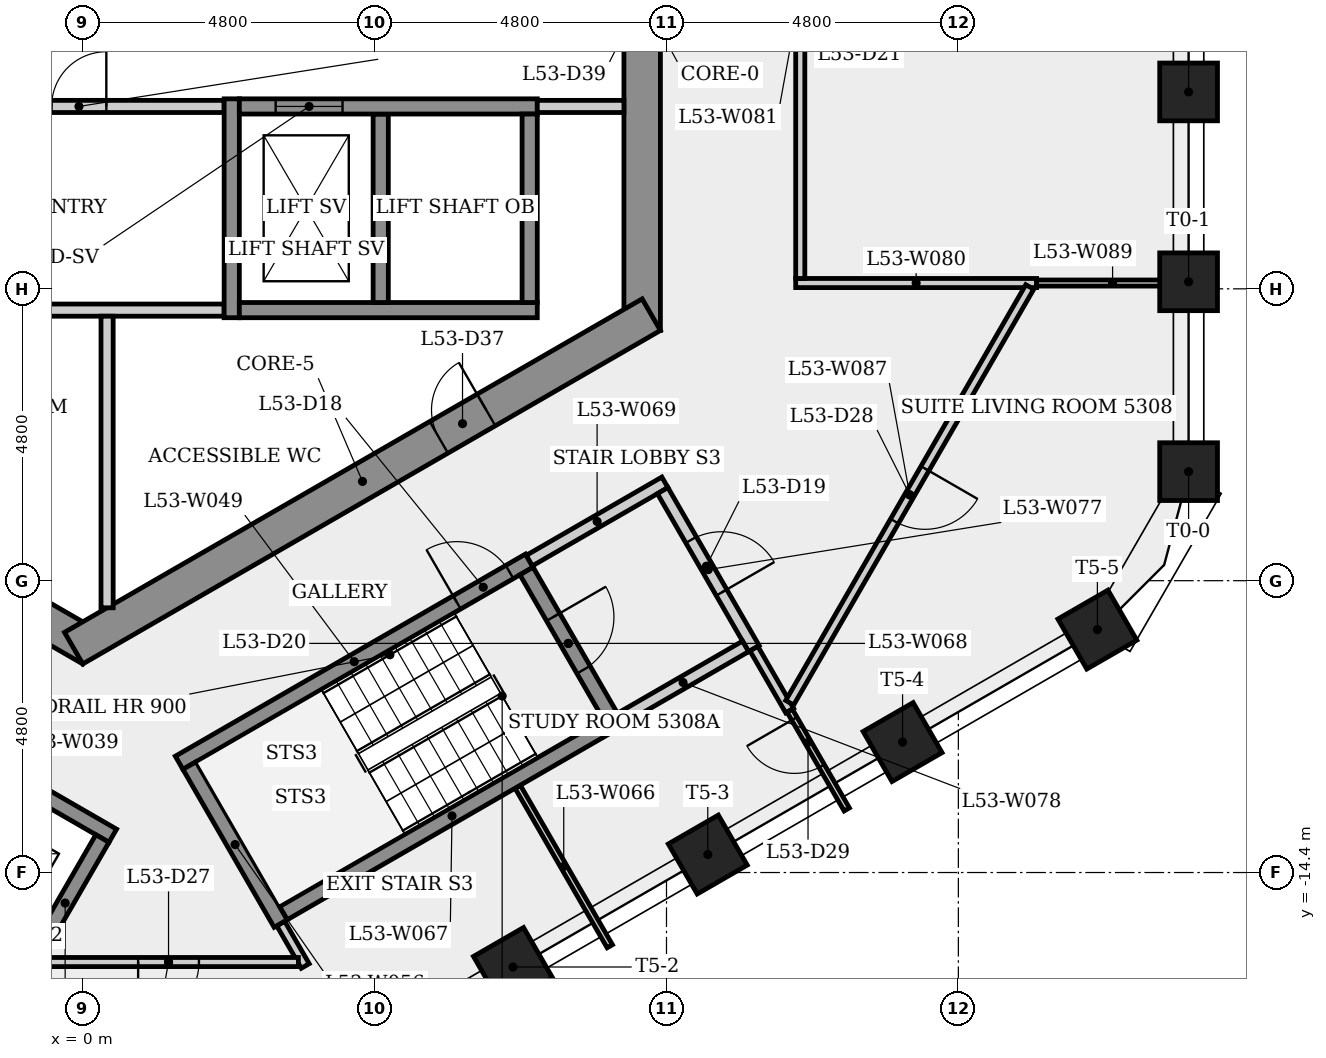
"""IFC4 building model, lengths in metres.
Left out: names, types, materials, properties, quantities, classifications, styles, units other than length and angle.
Written with IfcOpenShell. Run it as: python <this file> out.ifc"""

import sys

from ifc_helpers import new_model, si_unit, direction, frame, frame_2d, origin, origin_2d, place, context, subcontext, project, spatial, rectangle, extrude, element, fill, save


model = new_model("IFC4")
c1 = context("Model", 3, precision=1e-05, world=origin(), true_north=direction((0.0, 1.0)))
c2 = subcontext(c1, "Body", "Model", "MODEL_VIEW")
j1 = project(units=[si_unit("LENGTHUNIT", "METRE"), si_unit("PLANEANGLEUNIT", "RADIAN")], contexts=[c1])
p1 = place(None, origin())
s1 = spatial("IfcSite", under=j1, at=p1, CompositionType="ELEMENT")
p2 = place(p1, origin())
s2 = spatial("IfcBuilding", under=s1, at=p2, CompositionType="ELEMENT")
p3 = place(p2, frame((0.0, 0.0, 198.7)))
s3 = spatial("IfcBuildingStorey", under=s2, at=p3, CompositionType="ELEMENT", Elevation=198.7)
p4 = place(p3, frame((9.2, -5.485, 0.0), z_axis=(0.0, 0.0, 1.0), x_axis=(0.0, 1.0, 0.0)))
e1 = element("IfcWall", 1, at=p4, inside=s3, PredefinedType="SHEAR", context=c2, shape_type="SweptSolid", body=[
    extrude(rectangle(XDim=10.97, YDim=0.6, at=frame_2d((5.485, 0.0))), origin(), (0.0, 0.0, 1.0), 3.4),
])
p5 = place(p4, frame((4.685, 0.0, 0.0)))
e2 = element("IfcOpeningElement", 2, at=p5, cuts=e1, PredefinedType="OPENING", context=c2, shape_type="SweptSolid", body=[
    extrude(rectangle(XDim=1.6, YDim=2.1, at=frame_2d((0.8, 1.05))), frame((0.0, 0.31, 0.0), z_axis=(0.0, -1.0, 0.0), x_axis=(1.0, 0.0, 0.0)), (0.0, 0.0, 1.0), 0.62),
])
p6 = place(p3, frame((-9.35, -5.225, 0.0), z_axis=(0.0, 0.0, 1.0), x_axis=(0.866023993627, -0.500002442456, 0.0)))
e3 = element("IfcWall", 3, at=p6, inside=s3, PredefinedType="SHEAR", context=c2, shape_type="SweptSolid", body=[
    extrude(rectangle(XDim=10.97, YDim=0.6, at=frame_2d((5.485, 0.0))), origin(), (0.0, 0.0, 1.0), 3.4),
])
p7 = place(p6, frame((3.084, 0.0, 0.0)))
e4 = element("IfcOpeningElement", 4, at=p7, cuts=e3, PredefinedType="OPENING", context=c2, shape_type="SweptSolid", body=[
    extrude(rectangle(XDim=0.9, YDim=2.1, at=frame_2d((0.45, 1.05))), frame((0.0, 0.31, 0.0), z_axis=(0.0, -1.0, 0.0), x_axis=(1.0, 0.0, 0.0)), (0.0, 0.0, 1.0), 0.62),
])
p8 = place(p6, frame((8.21, 0.0, 0.0)))
e5 = element("IfcOpeningElement", 5, at=p8, cuts=e3, PredefinedType="OPENING", context=c2, shape_type="SweptSolid", body=[
    extrude(rectangle(XDim=0.9, YDim=2.1, at=frame_2d((0.45, 1.05))), frame((0.0, 0.31, 0.0), z_axis=(0.0, -1.0, 0.0), x_axis=(1.0, 0.0, 0.0)), (0.0, 0.0, 1.0), 0.62),
])
p9 = place(p3, frame((-0.15, -10.71, 0.0), z_axis=(0.0, 0.0, 1.0), x_axis=(0.866023993627, 0.500002442456, 0.0)))
e6 = element("IfcWall", 6, at=p9, inside=s3, PredefinedType="SHEAR", context=c2, shape_type="SweptSolid", body=[
    extrude(rectangle(XDim=10.97, YDim=0.6, at=frame_2d((5.485, 0.0))), origin(), (0.0, 0.0, 1.0), 3.4),
])
p10 = place(p9, frame((6.935, 0.0, 0.0)))
e7 = element("IfcOpeningElement", 7, at=p10, cuts=e6, PredefinedType="OPENING", context=c2, shape_type="SweptSolid", body=[
    extrude(rectangle(XDim=0.9, YDim=2.1, at=frame_2d((0.45, 1.05))), frame((0.0, 0.31, 0.0), z_axis=(0.0, -1.0, 0.0), x_axis=(1.0, 0.0, 0.0)), (0.0, 0.0, 1.0), 0.62),
])
for number, where, z_axis, x_axis in (
    (8, (18.187, -7.807, 0.0), (0.0, 0.0, 1.0), (1.0, 0.0, 0.0)),
    (9, (18.187, -4.684, 0.0), (0.0, 0.0, 1.0), (1.0, 0.0, 0.0)),
    (10, (18.187, -1.561, 0.0), (0.0, 0.0, 1.0), (1.0, 0.0, 0.0)),
    (11, (7.075, -15.954, 0.0), (0.0, 0.0, 1.0), (0.5, -0.866, 0.0)),
    (12, (10.279, -14.104, 0.0), (0.0, 0.0, 1.0), (0.5, -0.866, 0.0)),
    (13, (13.483, -12.254, 0.0), (0.0, 0.0, 1.0), (0.5, -0.866, 0.0)),
    (14, (16.687, -10.405, 0.0), (0.0, 0.0, 1.0), (0.5, -0.866, 0.0)),
):
    element("IfcColumn", number, at=place(p3, frame(where, z_axis=z_axis, x_axis=x_axis)), inside=s3, PredefinedType="COLUMN", context=c2, shape_type="SweptSolid", body=[
        extrude(rectangle(XDim=0.95, YDim=0.95, at=origin_2d()), origin(), (0.0, 0.0, 1.0), 3.4),
    ])
p11 = place(p3, frame((-8.88, -5.15, 0.0), z_axis=(0.0, 0.0, 1.0), x_axis=(1.0, 0.0, 0.0)))
e15 = element("IfcWall", 15, at=p11, inside=s3, PredefinedType="PARTITIONING", context=c2, shape_type="SweptSolid", body=[
    extrude(rectangle(XDim=11.205, YDim=0.2, at=frame_2d((5.603, 0.0))), origin(), (0.0, 0.0, 1.0), 3.0),
])
p12 = place(p3, frame((-8.9, -1.8, 0.0), z_axis=(0.0, 0.0, 1.0), x_axis=(1.0, 0.0, 0.0)))
e16 = element("IfcWall", 16, at=p12, inside=s3, PredefinedType="PARTITIONING", context=c2, shape_type="SweptSolid", body=[
    extrude(rectangle(XDim=11.225, YDim=0.2, at=frame_2d((5.613, 0.0))), origin(), (0.0, 0.0, 1.0), 3.0),
])
p13 = place(p12, frame((2.485, 0.0, 0.0)))
e17 = element("IfcOpeningElement", 17, at=p13, cuts=e16, PredefinedType="OPENING", context=c2, shape_type="SweptSolid", body=[
    extrude(rectangle(XDim=0.9, YDim=2.1, at=frame_2d((0.45, 1.05))), frame((0.0, 0.11, 0.0), z_axis=(0.0, -1.0, 0.0), x_axis=(1.0, 0.0, 0.0)), (0.0, 0.0, 1.0), 0.22),
])
p14 = place(p12, frame((8.387, 0.0, 0.0)))
e18 = element("IfcOpeningElement", 18, at=p14, cuts=e16, PredefinedType="OPENING", context=c2, shape_type="SweptSolid", body=[
    extrude(rectangle(XDim=0.9, YDim=2.1, at=frame_2d((0.45, 1.05))), frame((0.0, 0.11, 0.0), z_axis=(0.0, -1.0, 0.0), x_axis=(1.0, 0.0, 0.0)), (0.0, 0.0, 1.0), 0.22),
])
p15 = place(p3, frame((-2.364, -12.145, 0.0), z_axis=(0.0, 0.0, 1.0), x_axis=(0.866040211805, -0.499974350878, 0.0)))
e19 = element("IfcWall", 19, at=p15, inside=s3, PredefinedType="SHEAR", context=c2, shape_type="SweptSolid", body=[
    extrude(rectangle(XDim=3.3, YDim=0.25, at=frame_2d((1.65, 0.0))), origin(), (0.0, 0.0, 1.0), 3.0),
])
p16 = place(p3, frame((-0.902, -15.962, 0.0), z_axis=(0.0, 0.0, 1.0), x_axis=(0.500061746146, 0.865989751695, 0.0)))
e20 = element("IfcWall", 20, at=p16, inside=s3, PredefinedType="SHEAR", context=c2, shape_type="SweptSolid", body=[
    extrude(rectangle(XDim=2.45, YDim=0.25, at=frame_2d((1.225, 0.0))), origin(), (0.0, 0.0, 1.0), 3.4),
])
p17 = place(p3, frame((0.4, -5.25, 0.0), z_axis=(0.0, 0.0, 1.0), x_axis=(0.0, -1.0, 0.0)))
e21 = element("IfcWall", 21, at=p17, inside=s3, PredefinedType="PARTITIONING", context=c2, shape_type="SweptSolid", body=[
    extrude(rectangle(XDim=4.796, YDim=0.2, at=frame_2d((2.398, 0.0))), origin(), (0.0, 0.0, 1.0), 3.0),
])
p18 = place(p3, frame((1.585, -12.595, 0.0), z_axis=(0.0, 0.0, 1.0), x_axis=(0.866036417653, 0.499980922934, 0.0)))
e22 = element("IfcWall", 22, at=p18, inside=s3, PredefinedType="SHEAR", context=c2, shape_type="SweptSolid", body=[
    extrude(rectangle(XDim=6.65, YDim=0.25, at=frame_2d((3.325, 0.0))), origin(), (0.0, 0.0, 1.0), 3.0),
])
p19 = place(p18, frame((5.275, 0.0, 0.0)))
e23 = element("IfcOpeningElement", 23, at=p19, cuts=e22, PredefinedType="OPENING", context=c2, shape_type="SweptSolid", body=[
    extrude(rectangle(XDim=1.0, YDim=2.1, at=frame_2d((0.5, 1.05))), frame((0.0, 0.135, 0.0), z_axis=(0.0, -1.0, 0.0), x_axis=(1.0, 0.0, 0.0)), (0.0, 0.0, 1.0), 0.27),
])
p20 = place(p3, frame((2.45, -5.275, 0.0), z_axis=(0.0, 0.0, 1.0), x_axis=(0.0, 1.0, 0.0)))
e24 = element("IfcWall", 24, at=p20, inside=s3, PredefinedType="SHEAR", context=c2, shape_type="SweptSolid", body=[
    extrude(rectangle(XDim=3.6, YDim=0.25, at=frame_2d((1.8, 0.0))), origin(), (0.0, 0.0, 1.0), 3.0),
])
p21 = place(p3, frame((3.256, -15.239, 0.0), z_axis=(0.0, 0.0, 1.0), x_axis=(0.499818546685, -0.866130140562, 0.0)))
e25 = element("IfcWall", 25, at=p21, inside=s3, PredefinedType="PARTITIONING", context=c2, shape_type="SweptSolid", body=[
    extrude(rectangle(XDim=0.806, YDim=0.15, at=frame_2d((0.403, 0.0))), origin(), (0.0, 0.0, 1.0), 3.0),
])
p22 = place(p3, frame((3.256, -15.239, 0.0), z_axis=(0.0, 0.0, 1.0), x_axis=(-0.50002537861, 0.866010750942, 0.0)))
e26 = element("IfcWall", 26, at=p22, inside=s3, PredefinedType="SHEAR", context=c2, shape_type="SweptSolid", body=[
    extrude(rectangle(XDim=3.0, YDim=0.25, at=frame_2d((1.5, 0.0))), origin(), (0.0, 0.0, 1.0), 3.0),
])
p23 = place(p3, frame((3.546, -15.872, 0.0), z_axis=(0.0, 0.0, 1.0), x_axis=(-1.0, 0.0, 0.0)))
e27 = element("IfcWall", 27, at=p23, inside=s3, PredefinedType="PARTITIONING", context=c2, shape_type="SweptSolid", body=[
    extrude(rectangle(XDim=4.271, YDim=0.15, at=frame_2d((2.136, 0.0))), origin(), (0.0, 0.0, 1.0), 3.0),
])
p24 = place(p23, frame((1.636, 0.0, 0.0)))
e28 = element("IfcOpeningElement", 28, at=p24, cuts=e27, PredefinedType="OPENING", context=c2, shape_type="SweptSolid", body=[
    extrude(rectangle(XDim=1.0, YDim=2.1, at=frame_2d((0.5, 1.05))), frame((0.0, 0.085, 0.0), z_axis=(0.0, -1.0, 0.0), x_axis=(1.0, 0.0, 0.0)), (0.0, 0.0, 1.0), 0.17),
])
p25 = place(p3, frame((2.575, -5.15, 0.0), z_axis=(0.0, 0.0, 1.0), x_axis=(1.0, 0.0, 0.0)))
e29 = element("IfcWall", 29, at=p25, inside=s3, PredefinedType="SHEAR", context=c2, shape_type="SweptSolid", body=[
    extrude(rectangle(XDim=4.9, YDim=0.25, at=frame_2d((2.45, 0.0))), origin(), (0.0, 0.0, 1.0), 3.0),
])
p26 = place(p3, frame((4.9, -1.925, 0.0), z_axis=(0.0, 0.0, 1.0), x_axis=(0.0, -1.0, 0.0)))
e30 = element("IfcWall", 30, at=p26, inside=s3, PredefinedType="SHEAR", context=c2, shape_type="SweptSolid", body=[
    extrude(rectangle(XDim=3.1, YDim=0.25, at=frame_2d((1.55, 0.0))), origin(), (0.0, 0.0, 1.0), 3.4),
])
p27 = place(p3, frame((2.575, -1.8, 0.0), z_axis=(0.0, 0.0, 1.0), x_axis=(1.0, 0.0, 0.0)))
e31 = element("IfcWall", 31, at=p27, inside=s3, PredefinedType="SHEAR", context=c2, shape_type="SweptSolid", body=[
    extrude(rectangle(XDim=4.9, YDim=0.25, at=frame_2d((2.45, 0.0))), origin(), (0.0, 0.0, 1.0), 3.0),
])
p28 = place(p27, frame((0.597, 0.0, 0.0)))
e32 = element("IfcOpeningElement", 32, at=p28, cuts=e31, PredefinedType="OPENING", context=c2, shape_type="SweptSolid", body=[
    extrude(rectangle(XDim=1.1, YDim=2.1, at=frame_2d((0.55, 1.05))), frame((0.0, 0.135, 0.0), z_axis=(0.0, -1.0, 0.0), x_axis=(1.0, 0.0, 0.0)), (0.0, 0.0, 1.0), 0.27),
])
p29 = place(p3, frame((7.153, -12.989, 0.0), z_axis=(0.0, 0.0, 1.0), x_axis=(0.500013093982, -0.866017843839, 0.0)))
e33 = element("IfcWall", 33, at=p29, inside=s3, PredefinedType="PARTITIONING", context=c2, shape_type="SweptSolid", body=[
    extrude(rectangle(XDim=3.03, YDim=0.1, at=frame_2d((1.515, 0.0))), origin(), (0.0, 0.0, 1.0), 3.0),
])
p30 = place(p3, frame((3.301, -15.068, 0.0), z_axis=(0.0, 0.0, 1.0), x_axis=(0.866035036182, 0.499983315828, 0.0)))
e34 = element("IfcWall", 34, at=p30, inside=s3, PredefinedType="SHEAR", context=c2, shape_type="SweptSolid", body=[
    extrude(rectangle(XDim=6.4, YDim=0.25, at=frame_2d((3.2, 0.0))), origin(), (0.0, 0.0, 1.0), 3.0),
])
p31 = place(p3, frame((7.298, -9.441, 0.0), z_axis=(0.0, 0.0, 1.0), x_axis=(0.500034990121, -0.866005201286, 0.0)))
e35 = element("IfcWall", 35, at=p31, inside=s3, PredefinedType="SHEAR", context=c2, shape_type="SweptSolid", body=[
    extrude(rectangle(XDim=2.75, YDim=0.25, at=frame_2d((1.375, 0.0))), origin(), (0.0, 0.0, 1.0), 3.0),
])
p32 = place(p31, frame((0.875, 0.0, 0.0)))
e36 = element("IfcOpeningElement", 36, at=p32, cuts=e35, PredefinedType="OPENING", context=c2, shape_type="SweptSolid", body=[
    extrude(rectangle(XDim=1.0, YDim=2.1, at=frame_2d((0.5, 1.05))), frame((0.0, 0.135, 0.0), z_axis=(0.0, -1.0, 0.0), x_axis=(1.0, 0.0, 0.0)), (0.0, 0.0, 1.0), 0.27),
])
p33 = place(p3, frame((7.344, -9.27, 0.0), z_axis=(0.0, 0.0, 1.0), x_axis=(0.866005588531, 0.500034319456, 0.0)))
e37 = element("IfcWall", 37, at=p33, inside=s3, PredefinedType="PARTITIONING", context=c2, shape_type="SweptSolid", body=[
    extrude(rectangle(XDim=2.575, YDim=0.2, at=frame_2d((1.288, 0.0))), origin(), (0.0, 0.0, 1.0), 3.0),
])
p34 = place(p3, frame((7.35, -1.925, 0.0), z_axis=(0.0, 0.0, 1.0), x_axis=(0.0, -1.0, 0.0)))
e38 = element("IfcWall", 38, at=p34, inside=s3, PredefinedType="SHEAR", context=c2, shape_type="SweptSolid", body=[
    extrude(rectangle(XDim=3.1, YDim=0.25, at=frame_2d((1.55, 0.0))), origin(), (0.0, 0.0, 1.0), 3.4),
])
p35 = place(p3, frame((8.9, -1.8, 0.0), z_axis=(0.0, 0.0, 1.0), x_axis=(-1.0, 0.0, 0.0)))
e39 = element("IfcWall", 39, at=p35, inside=s3, PredefinedType="PARTITIONING", context=c2, shape_type="SweptSolid", body=[
    extrude(rectangle(XDim=1.425, YDim=0.2, at=frame_2d((0.712, 0.0))), origin(), (0.0, 0.0, 1.0), 3.0),
])
p36 = place(p3, frame((9.537, -8.119, 0.0), z_axis=(0.0, 0.0, 1.0), x_axis=(0.499990139034, -0.866031096941, 0.0)))
e40 = element("IfcWall", 40, at=p36, inside=s3, PredefinedType="PARTITIONING", context=c2, shape_type="SweptSolid", body=[
    extrude(rectangle(XDim=3.0, YDim=0.2, at=frame_2d((1.5, 0.0))), origin(), (0.0, 0.0, 1.0), 3.0),
])
p37 = place(p36, frame((0.935, 0.0, 0.0)))
e41 = element("IfcOpeningElement", 41, at=p37, cuts=e40, PredefinedType="OPENING", context=c2, shape_type="SweptSolid", body=[
    extrude(rectangle(XDim=1.0, YDim=2.1, at=frame_2d((0.5, 1.05))), frame((0.0, 0.11, 0.0), z_axis=(0.0, -1.0, 0.0), x_axis=(1.0, 0.0, 0.0)), (0.0, 0.0, 1.0), 0.22),
])
p38 = place(p3, frame((10.901, -10.681, 0.0), z_axis=(0.0, 0.0, 1.0), x_axis=(-0.866007538022, -0.500030943131, 0.0)))
e42 = element("IfcWall", 42, at=p38, inside=s3, PredefinedType="PARTITIONING", context=c2, shape_type="SweptSolid", body=[
    extrude(rectangle(XDim=2.375, YDim=0.2, at=frame_2d((1.188, 0.0))), origin(), (0.0, 0.0, 1.0), 3.0),
])
p39 = place(p3, frame((11.626, -11.737, 0.0), z_axis=(0.0, 0.0, 1.0), x_axis=(-0.499883919394, 0.866092412582, 0.0)))
e43 = element("IfcWall", 43, at=p39, inside=s3, PredefinedType="PARTITIONING", context=c2, shape_type="SweptSolid", body=[
    extrude(rectangle(XDim=1.178, YDim=0.15, at=frame_2d((0.589, 0.0))), origin(), (0.0, 0.0, 1.0), 3.0),
])
p40 = place(p3, frame((11.725, -4.705, 0.0), z_axis=(0.0, 0.0, 1.0), x_axis=(1.0, 0.0, 0.0)))
e44 = element("IfcWall", 44, at=p40, inside=s3, PredefinedType="PARTITIONING", context=c2, shape_type="SweptSolid", body=[
    extrude(rectangle(XDim=3.962, YDim=0.15, at=frame_2d((1.981, 0.0))), origin(), (0.0, 0.0, 1.0), 3.0),
])
p41 = place(p3, frame((11.8, 4.78, 0.0), z_axis=(0.0, 0.0, 1.0), x_axis=(0.0, -1.0, 0.0)))
e45 = element("IfcWall", 45, at=p41, inside=s3, PredefinedType="PARTITIONING", context=c2, shape_type="SweptSolid", body=[
    extrude(rectangle(XDim=9.409, YDim=0.15, at=frame_2d((4.705, 0.0))), origin(), (0.0, 0.0, 1.0), 3.0),
])
p42 = place(p41, frame((4.257, 0.0, 0.0)))
e46 = element("IfcOpeningElement", 46, at=p42, cuts=e45, PredefinedType="OPENING", context=c2, shape_type="SweptSolid", body=[
    extrude(rectangle(XDim=1.0, YDim=2.1, at=frame_2d((0.5, 1.05))), frame((0.0, 0.085, 0.0), z_axis=(0.0, -1.0, 0.0), x_axis=(1.0, 0.0, 0.0)), (0.0, 0.0, 1.0), 0.17),
])
p43 = place(p3, frame((12.565, -13.363, 0.0), z_axis=(0.0, 0.0, 1.0), x_axis=(-0.500056514623, 0.865992772593, 0.0)))
e47 = element("IfcWall", 47, at=p43, inside=s3, PredefinedType="PARTITIONING", context=c2, shape_type="SweptSolid", body=[
    extrude(rectangle(XDim=1.877, YDim=0.1, at=frame_2d((0.938, 0.0))), origin(), (0.0, 0.0, 1.0), 3.0),
])
p44 = place(p43, frame((0.824, 0.0, 0.0)))
e48 = element("IfcOpeningElement", 48, at=p44, cuts=e47, PredefinedType="OPENING", context=c2, shape_type="SweptSolid", body=[
    extrude(rectangle(XDim=0.9, YDim=2.1, at=frame_2d((0.45, 1.05))), frame((0.0, 0.06, 0.0), z_axis=(0.0, -1.0, 0.0), x_axis=(1.0, 0.0, 0.0)), (0.0, 0.0, 1.0), 0.12),
])
p45 = place(p3, frame((15.574, -4.769, 0.0), z_axis=(0.0, 0.0, 1.0), x_axis=(-0.499999914436, -0.866025453185, 0.0)))
e49 = element("IfcWall", 49, at=p45, inside=s3, PredefinedType="PARTITIONING", context=c2, shape_type="SweptSolid", body=[
    extrude(rectangle(XDim=7.896, YDim=0.15, at=frame_2d((3.948, 0.0))), origin(), (0.0, 0.0, 1.0), 3.0),
])
p46 = place(p45, frame((3.448, 0.0, 0.0)))
e50 = element("IfcOpeningElement", 50, at=p46, cuts=e49, PredefinedType="OPENING", context=c2, shape_type="SweptSolid", body=[
    extrude(rectangle(XDim=1.0, YDim=2.1, at=frame_2d((0.5, 1.05))), frame((0.0, 0.085, 0.0), z_axis=(0.0, -1.0, 0.0), x_axis=(1.0, 0.0, 0.0)), (0.0, 0.0, 1.0), 0.17),
])
p47 = place(p3, frame((18.187, -4.705, 0.0), z_axis=(0.0, 0.0, 1.0), x_axis=(-1.0, 0.0, 0.0)))
e51 = element("IfcWall", 51, at=p47, inside=s3, PredefinedType="PARTITIONING", context=c2, shape_type="SweptSolid", body=[
    extrude(rectangle(XDim=2.5, YDim=0.1, at=frame_2d((1.25, 0.0))), origin(), (0.0, 0.0, 1.0), 3.0),
])
p48 = place(p28, origin())
e52 = element("IfcDoor", 52, at=p48, inside=s3, OperationType="SLIDING_TO_LEFT", PredefinedType="DOOR", context=c2, shape_type="SweptSolid", body=[
    extrude(rectangle(XDim=1.1, YDim=2.1, at=frame_2d((0.55, 1.05))), frame((0.0, 0.025, 0.0), z_axis=(0.0, -1.0, 0.0), x_axis=(1.0, 0.0, 0.0)), (0.0, 0.0, 1.0), 0.05),
])
fill(e32, e52)
p49 = place(p14, origin())
e53 = element("IfcDoor", 53, at=p49, inside=s3, OperationType="SINGLE_SWING_RIGHT", PredefinedType="DOOR", context=c2, shape_type="SweptSolid", body=[
    extrude(rectangle(XDim=0.9, YDim=2.1, at=frame_2d((0.45, 1.05))), frame((0.0, 0.025, 0.0), z_axis=(0.0, -1.0, 0.0), x_axis=(1.0, 0.0, 0.0)), (0.0, 0.0, 1.0), 0.05),
])
fill(e18, e53)
p50 = place(p19, origin())
e54 = element("IfcDoor", 54, at=p50, inside=s3, OperationType="SINGLE_SWING_LEFT", PredefinedType="DOOR", context=c2, shape_type="SweptSolid", body=[
    extrude(rectangle(XDim=1.0, YDim=2.1, at=frame_2d((0.5, 1.05))), frame((0.0, 0.025, 0.0), z_axis=(0.0, -1.0, 0.0), x_axis=(1.0, 0.0, 0.0)), (0.0, 0.0, 1.0), 0.05),
])
fill(e23, e54)
p51 = place(p37, origin())
e55 = element("IfcDoor", 55, at=p51, inside=s3, OperationType="SINGLE_SWING_RIGHT", PredefinedType="DOOR", context=c2, shape_type="SweptSolid", body=[
    extrude(rectangle(XDim=1.0, YDim=2.1, at=frame_2d((0.5, 1.05))), frame((0.0, 0.025, 0.0), z_axis=(0.0, -1.0, 0.0), x_axis=(1.0, 0.0, 0.0)), (0.0, 0.0, 1.0), 0.05),
])
fill(e41, e55)
p52 = place(p32, origin())
e56 = element("IfcDoor", 56, at=p52, inside=s3, OperationType="SINGLE_SWING_LEFT", PredefinedType="DOOR", context=c2, shape_type="SweptSolid", body=[
    extrude(rectangle(XDim=1.0, YDim=2.1, at=frame_2d((0.5, 1.05))), frame((0.0, 0.025, 0.0), z_axis=(0.0, -1.0, 0.0), x_axis=(1.0, 0.0, 0.0)), (0.0, 0.0, 1.0), 0.05),
])
fill(e36, e56)
p53 = place(p24, origin())
e57 = element("IfcDoor", 57, at=p53, inside=s3, OperationType="SINGLE_SWING_RIGHT", PredefinedType="DOOR", context=c2, shape_type="SweptSolid", body=[
    extrude(rectangle(XDim=1.0, YDim=2.1, at=frame_2d((0.5, 1.05))), frame((0.0, 0.025, 0.0), z_axis=(0.0, -1.0, 0.0), x_axis=(1.0, 0.0, 0.0)), (0.0, 0.0, 1.0), 0.05),
])
fill(e28, e57)
p54 = place(p46, origin())
e58 = element("IfcDoor", 58, at=p54, inside=s3, OperationType="SINGLE_SWING_LEFT", PredefinedType="DOOR", context=c2, shape_type="SweptSolid", body=[
    extrude(rectangle(XDim=1.0, YDim=2.1, at=frame_2d((0.5, 1.05))), frame((0.0, 0.025, 0.0), z_axis=(0.0, -1.0, 0.0), x_axis=(1.0, 0.0, 0.0)), (0.0, 0.0, 1.0), 0.05),
])
fill(e50, e58)
p55 = place(p44, origin())
e59 = element("IfcDoor", 59, at=p55, inside=s3, OperationType="SINGLE_SWING_RIGHT", PredefinedType="DOOR", context=c2, shape_type="SweptSolid", body=[
    extrude(rectangle(XDim=0.9, YDim=2.1, at=frame_2d((0.45, 1.05))), frame((0.0, 0.025, 0.0), z_axis=(0.0, -1.0, 0.0), x_axis=(1.0, 0.0, 0.0)), (0.0, 0.0, 1.0), 0.05),
])
fill(e48, e59)
p56 = place(p10, origin())
e60 = element("IfcDoor", 60, at=p56, inside=s3, OperationType="SINGLE_SWING_RIGHT", PredefinedType="DOOR", context=c2, shape_type="SweptSolid", body=[
    extrude(rectangle(XDim=0.9, YDim=2.1, at=frame_2d((0.45, 1.05))), frame((0.0, 0.025, 0.0), z_axis=(0.0, -1.0, 0.0), x_axis=(1.0, 0.0, 0.0)), (0.0, 0.0, 1.0), 0.05),
])
fill(e7, e60)
save(model, sys.argv[1])
